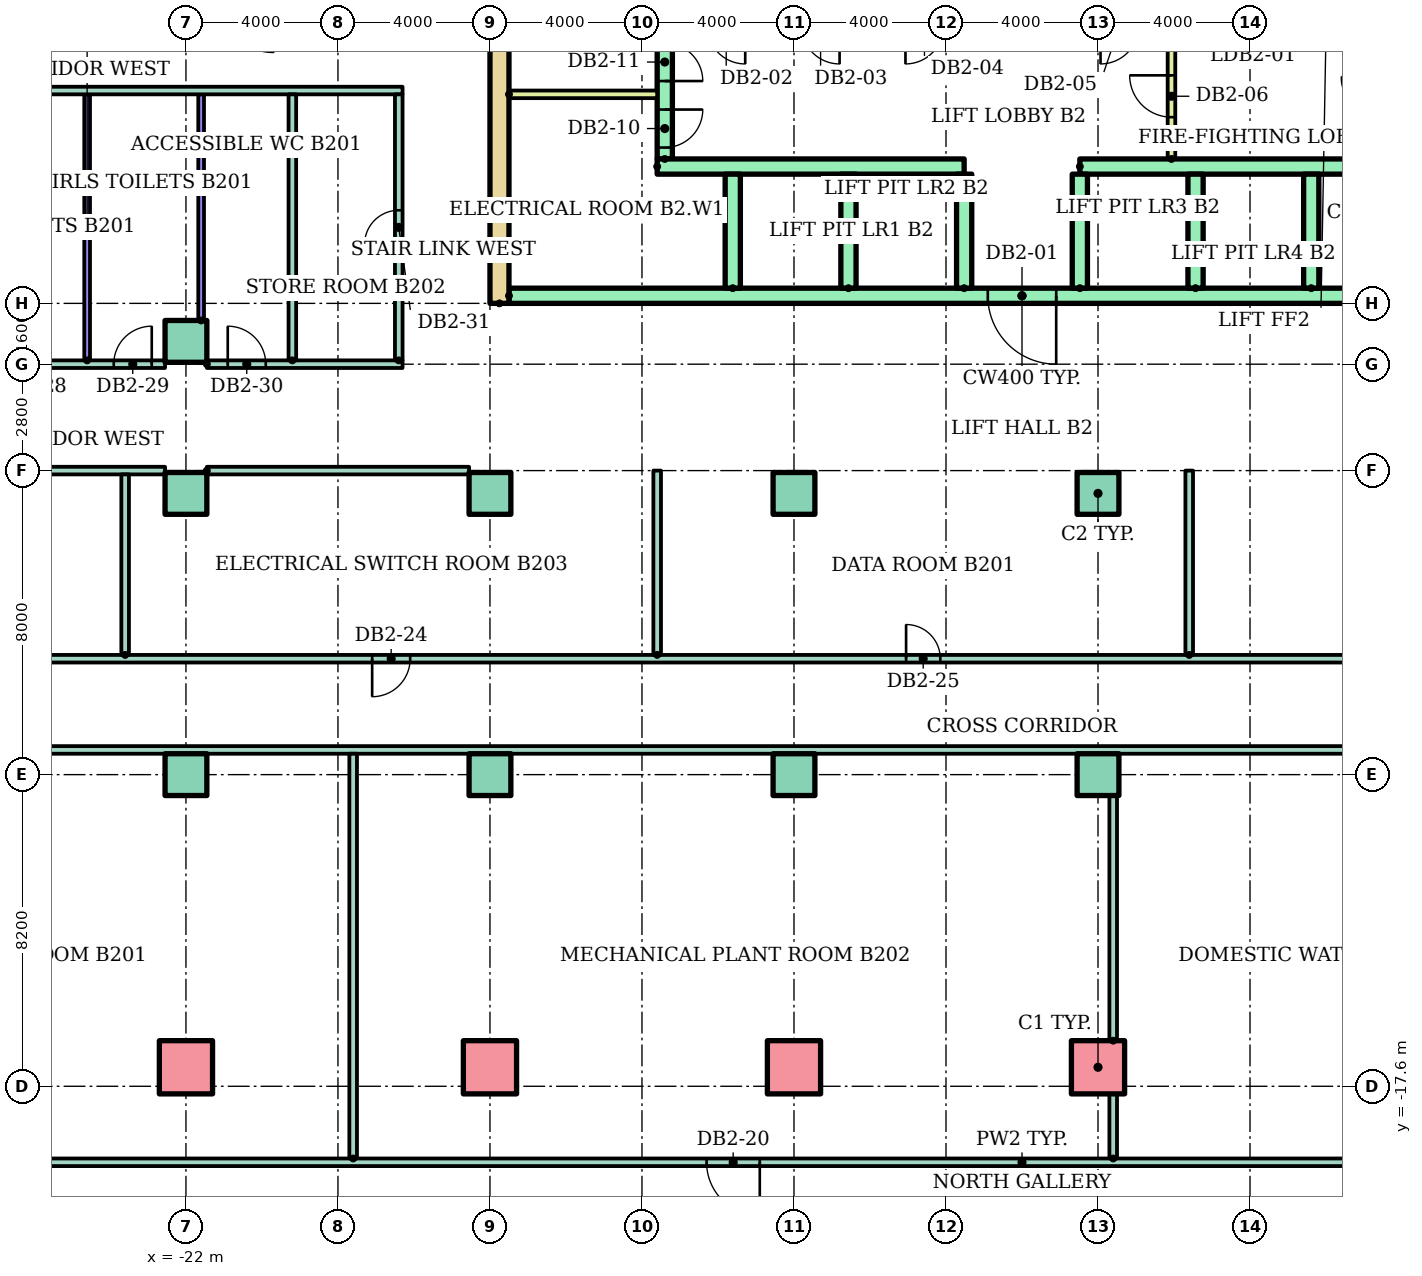
"""IFC4 building model, lengths in metres.
Left out: names, types, materials, properties, quantities, classifications, styles, units other than length and angle.
Written with IfcOpenShell. Run it as: python <this file> out.ifc"""

import sys

from ifc_helpers import new_model, si_unit, direction, frame, frame_2d, origin, origin_2d, place, context, subcontext, project, spatial, rectangle, hollow_rectangle, extrude, element, fill, save


model = new_model("IFC4")
c1 = context("Model", 3, precision=1e-05, world=origin(), true_north=direction((0.0, 1.0)))
c2 = subcontext(c1, "Body", "Model", "MODEL_VIEW")
j1 = project(units=[si_unit("LENGTHUNIT", "METRE"), si_unit("PLANEANGLEUNIT", "RADIAN")], contexts=[c1])
p1 = place(None, origin())
s1 = spatial("IfcSite", under=j1, at=p1, CompositionType="ELEMENT")
p2 = place(p1, origin())
s2 = spatial("IfcBuilding", under=s1, at=p2, CompositionType="ELEMENT")
p3 = place(p2, frame((0.0, 0.0, -10.0)))
s3 = spatial("IfcBuildingStorey", under=s2, at=p3, CompositionType="ELEMENT", Elevation=-10.0)
for number, where in (
    (1, (-22.0, -17.1, -0.3)),
    (2, (-14.0, -17.1, -0.3)),
    (3, (-6.0, -17.1, -0.3)),
    (4, (2.0, -17.1, -0.3)),
):
    element("IfcColumn", number, at=place(p3, frame(where)), inside=s3, PredefinedType="COLUMN", context=c2, shape_type="SweptSolid", body=[
        extrude(hollow_rectangle(XDim=1.4, YDim=1.4, WallThickness=0.08, at=origin_2d()), origin(), (0.0, 0.0, 1.0), 5.3),
    ])
for number, where in (
    (5, (-22.0, -9.4, -0.3)),
    (6, (-14.0, -9.4, -0.3)),
    (7, (-6.0, -9.4, -0.3)),
    (8, (2.0, -9.4, -0.3)),
    (9, (-22.0, -2.0, -0.3)),
    (10, (-14.0, -2.0, -0.3)),
    (11, (-6.0, -2.0, -0.3)),
    (12, (2.0, -2.0, -0.3)),
    (13, (-22.0, 2.0, -0.3)),
):
    element("IfcColumn", number, at=place(p3, frame(where)), inside=s3, PredefinedType="COLUMN", context=c2, shape_type="SweptSolid", body=[
        extrude(rectangle(XDim=1.1, YDim=1.1, at=origin_2d()), origin(), (0.0, 0.0, 1.0), 5.3),
    ])
p4 = place(p3, frame((-13.75, 3.0, 0.0), z_axis=(0.0, 0.0, 1.0), x_axis=(0.0, 1.0, 0.0)))
e14 = element("IfcWall", 14, at=p4, inside=s3, PredefinedType="SHEAR", context=c2, shape_type="SweptSolid", body=[
    extrude(rectangle(XDim=17.4, YDim=0.5, at=frame_2d((8.7, 0.0))), origin(), (0.0, 0.0, 1.0), 4.65),
])
p5 = place(p3, frame((-9.4, 6.8, 0.0), z_axis=(0.0, 0.0, 1.0), x_axis=(0.0, 1.0, 0.0)))
e15 = element("IfcWall", 15, at=p5, inside=s3, PredefinedType="SHEAR", context=c2, shape_type="SweptSolid", body=[
    extrude(rectangle(XDim=12.7, YDim=0.4, at=frame_2d((6.35, 0.0))), origin(), (0.0, 0.0, 1.0), 4.65),
])
p6 = place(p5, frame((0.3, 0.0, 0.0)))
e16 = element("IfcOpeningElement", 16, at=p6, cuts=e15, PredefinedType="OPENING", context=c2, shape_type="SweptSolid", body=[
    extrude(rectangle(XDim=1.0, YDim=2.1, at=frame_2d((0.5, 1.05))), frame((0.0, 0.21, 0.0), z_axis=(0.0, -1.0, 0.0), x_axis=(1.0, 0.0, 0.0)), (0.0, 0.0, 1.0), 0.42),
])
p7 = place(p5, frame((2.05, 0.0, 0.0)))
e17 = element("IfcOpeningElement", 17, at=p7, cuts=e15, PredefinedType="OPENING", context=c2, shape_type="SweptSolid", body=[
    extrude(rectangle(XDim=1.0, YDim=2.1, at=frame_2d((0.5, 1.05))), frame((0.0, 0.21, 0.0), z_axis=(0.0, -1.0, 0.0), x_axis=(1.0, 0.0, 0.0)), (0.0, 0.0, 1.0), 0.42),
])
p8 = place(p5, frame((7.925, 0.0, 0.0)))
e18 = element("IfcOpeningElement", 18, at=p8, cuts=e15, PredefinedType="OPENING", context=c2, shape_type="SweptSolid", body=[
    extrude(rectangle(XDim=1.0, YDim=2.1, at=frame_2d((0.5, 1.05))), frame((0.0, 0.21, 0.0), z_axis=(0.0, -1.0, 0.0), x_axis=(1.0, 0.0, 0.0)), (0.0, 0.0, 1.0), 0.42),
])
p9 = place(p3, frame((-13.5, 3.2, 0.0)))
e19 = element("IfcWall", 19, at=p9, inside=s3, PredefinedType="SHEAR", context=c2, shape_type="SweptSolid", body=[
    extrude(rectangle(XDim=27.0, YDim=0.4, at=frame_2d((13.5, 0.0))), origin(), (0.0, 0.0, 1.0), 4.65),
])
p10 = place(p9, frame((12.6, 0.0, 0.0)))
e20 = element("IfcOpeningElement", 20, at=p10, cuts=e19, PredefinedType="OPENING", context=c2, shape_type="SweptSolid", body=[
    extrude(rectangle(XDim=1.8, YDim=2.1, at=frame_2d((0.9, 1.05))), frame((0.0, 0.21, 0.0), z_axis=(0.0, -1.0, 0.0), x_axis=(1.0, 0.0, 0.0)), (0.0, 0.0, 1.0), 0.42),
])
for number, where in (
    (21, (-9.6, 6.6, 0.0)),
    (22, (1.522, 6.6, 0.0)),
):
    element("IfcWall", number, at=place(p3, frame(where)), inside=s3, PredefinedType="SHEAR", context=c2, shape_type="SweptSolid", body=[
        extrude(rectangle(XDim=8.078, YDim=0.4, at=frame_2d((4.039, 0.0))), origin(), (0.0, 0.0, 1.0), 4.65),
    ])
for number, where, z_axis, x_axis in (
    (23, (-7.611, 3.4, 0.0), (0.0, 0.0, 1.0), (0.0, 1.0, 0.0)),
    (24, (-4.567, 3.4, 0.0), (0.0, 0.0, 1.0), (0.0, 1.0, 0.0)),
    (25, (-1.522, 3.4, 0.0), (0.0, 0.0, 1.0), (0.0, 1.0, 0.0)),
    (26, (1.522, 3.4, 0.0), (0.0, 0.0, 1.0), (0.0, 1.0, 0.0)),
    (27, (4.567, 3.4, 0.0), (0.0, 0.0, 1.0), (0.0, 1.0, 0.0)),
    (28, (7.611, 3.4, 0.0), (0.0, 0.0, 1.0), (0.0, 1.0, 0.0)),
):
    element("IfcWall", number, at=place(p3, frame(where, z_axis=z_axis, x_axis=x_axis)), inside=s3, PredefinedType="SHEAR", context=c2, shape_type="SweptSolid", body=[
        extrude(rectangle(XDim=3.0, YDim=0.4, at=frame_2d((1.5, 0.0))), origin(), (0.0, 0.0, 1.0), 4.65),
    ])
p11 = place(p3, frame((3.933, 6.8, 0.0), z_axis=(0.0, 0.0, 1.0), x_axis=(0.0, 1.0, 0.0)))
e29 = element("IfcWall", 29, at=p11, inside=s3, PredefinedType="PARTITIONING", context=c2, shape_type="SweptSolid", body=[
    extrude(rectangle(XDim=3.3, YDim=0.2, at=frame_2d((1.65, 0.0))), origin(), (0.0, 0.0, 1.0), 4.65),
])
p12 = place(p11, frame((1.1, 0.0, 0.0)))
e30 = element("IfcOpeningElement", 30, at=p12, cuts=e29, PredefinedType="OPENING", context=c2, shape_type="SweptSolid", body=[
    extrude(rectangle(XDim=1.1, YDim=2.1, at=frame_2d((0.55, 1.05))), frame((0.0, 0.11, 0.0), z_axis=(0.0, -1.0, 0.0), x_axis=(1.0, 0.0, 0.0)), (0.0, 0.0, 1.0), 0.22),
])
p13 = place(p3, frame((-13.5, 8.5, 0.0)))
e31 = element("IfcWall", 31, at=p13, inside=s3, PredefinedType="PARTITIONING", context=c2, shape_type="SweptSolid", body=[
    extrude(rectangle(XDim=3.9, YDim=0.2, at=frame_2d((1.95, 0.0))), origin(), (0.0, 0.0, 1.0), 4.65),
])
p14 = place(p3, frame((-37.6, -19.6, 0.0)))
e32 = element("IfcWall", 32, at=p14, inside=s3, PredefinedType="PARTITIONING", context=c2, shape_type="SweptSolid", body=[
    extrude(rectangle(XDim=75.2, YDim=0.2, at=frame_2d((37.6, 0.0))), origin(), (0.0, 0.0, 1.0), 4.65),
])
p15 = place(p14, frame((9.3, 0.0, 0.0)))
e33 = element("IfcOpeningElement", 33, at=p15, cuts=e32, PredefinedType="OPENING", context=c2, shape_type="SweptSolid", body=[
    extrude(rectangle(XDim=1.4, YDim=2.1, at=frame_2d((0.7, 1.05))), frame((0.0, 0.11, 0.0), z_axis=(0.0, -1.0, 0.0), x_axis=(1.0, 0.0, 0.0)), (0.0, 0.0, 1.0), 0.22),
])
p16 = place(p14, frame((29.3, 0.0, 0.0)))
e34 = element("IfcOpeningElement", 34, at=p16, cuts=e32, PredefinedType="OPENING", context=c2, shape_type="SweptSolid", body=[
    extrude(rectangle(XDim=1.4, YDim=2.1, at=frame_2d((0.7, 1.05))), frame((0.0, 0.11, 0.0), z_axis=(0.0, -1.0, 0.0), x_axis=(1.0, 0.0, 0.0)), (0.0, 0.0, 1.0), 0.22),
])
p17 = place(p14, frame((46.5, 0.0, 0.0)))
e35 = element("IfcOpeningElement", 35, at=p17, cuts=e32, PredefinedType="OPENING", context=c2, shape_type="SweptSolid", body=[
    extrude(rectangle(XDim=1.0, YDim=2.1, at=frame_2d((0.5, 1.05))), frame((0.0, 0.11, 0.0), z_axis=(0.0, -1.0, 0.0), x_axis=(1.0, 0.0, 0.0)), (0.0, 0.0, 1.0), 0.22),
])
p18 = place(p14, frame((64.15, 0.0, 0.0)))
e36 = element("IfcOpeningElement", 36, at=p18, cuts=e32, PredefinedType="OPENING", context=c2, shape_type="SweptSolid", body=[
    extrude(rectangle(XDim=0.9, YDim=2.1, at=frame_2d((0.45, 1.05))), frame((0.0, 0.11, 0.0), z_axis=(0.0, -1.0, 0.0), x_axis=(1.0, 0.0, 0.0)), (0.0, 0.0, 1.0), 0.22),
])
p19 = place(p3, frame((-36.8, -8.75, 0.0)))
e37 = element("IfcWall", 37, at=p19, inside=s3, PredefinedType="PARTITIONING", context=c2, shape_type="SweptSolid", body=[
    extrude(rectangle(XDim=73.6, YDim=0.2, at=frame_2d((36.8, 0.0))), origin(), (0.0, 0.0, 1.0), 4.65),
])
p20 = place(p3, frame((-37.6, -6.35, 0.0)))
e38 = element("IfcWall", 38, at=p20, inside=s3, PredefinedType="PARTITIONING", context=c2, shape_type="SweptSolid", body=[
    extrude(rectangle(XDim=75.2, YDim=0.2, at=frame_2d((37.6, 0.0))), origin(), (0.0, 0.0, 1.0), 4.65),
])
p21 = place(p20, frame((6.5, 0.0, 0.0)))
e39 = element("IfcOpeningElement", 39, at=p21, cuts=e38, PredefinedType="OPENING", context=c2, shape_type="SweptSolid", body=[
    extrude(rectangle(XDim=1.0, YDim=2.1, at=frame_2d((0.5, 1.05))), frame((0.0, 0.11, 0.0), z_axis=(0.0, -1.0, 0.0), x_axis=(1.0, 0.0, 0.0)), (0.0, 0.0, 1.0), 0.22),
])
p22 = place(p20, frame((20.5, 0.0, 0.0)))
e40 = element("IfcOpeningElement", 40, at=p22, cuts=e38, PredefinedType="OPENING", context=c2, shape_type="SweptSolid", body=[
    extrude(rectangle(XDim=1.0, YDim=2.1, at=frame_2d((0.5, 1.05))), frame((0.0, 0.11, 0.0), z_axis=(0.0, -1.0, 0.0), x_axis=(1.0, 0.0, 0.0)), (0.0, 0.0, 1.0), 0.22),
])
p23 = place(p20, frame((34.55, 0.0, 0.0)))
e41 = element("IfcOpeningElement", 41, at=p23, cuts=e38, PredefinedType="OPENING", context=c2, shape_type="SweptSolid", body=[
    extrude(rectangle(XDim=0.9, YDim=2.1, at=frame_2d((0.45, 1.05))), frame((0.0, 0.11, 0.0), z_axis=(0.0, -1.0, 0.0), x_axis=(1.0, 0.0, 0.0)), (0.0, 0.0, 1.0), 0.22),
])
p24 = place(p20, frame((58.1, 0.0, 0.0)))
e42 = element("IfcOpeningElement", 42, at=p24, cuts=e38, PredefinedType="OPENING", context=c2, shape_type="SweptSolid", body=[
    extrude(rectangle(XDim=1.0, YDim=2.1, at=frame_2d((0.5, 1.05))), frame((0.0, 0.11, 0.0), z_axis=(0.0, -1.0, 0.0), x_axis=(1.0, 0.0, 0.0)), (0.0, 0.0, 1.0), 0.22),
])
for number, where in (
    (43, (-29.45, -1.4, 0.0)),
    (44, (-21.45, -1.4, 0.0)),
):
    element("IfcWall", number, at=place(p3, frame(where)), inside=s3, PredefinedType="PARTITIONING", context=c2, shape_type="SweptSolid", body=[
        extrude(rectangle(XDim=6.9, YDim=0.2, at=frame_2d((3.45, 0.0))), origin(), (0.0, 0.0, 1.0), 4.65),
    ])
p25 = place(p3, frame((-29.45, 1.4, 0.0)))
e45 = element("IfcWall", 45, at=p25, inside=s3, PredefinedType="PARTITIONING", context=c2, shape_type="SweptSolid", body=[
    extrude(rectangle(XDim=6.9, YDim=0.2, at=frame_2d((3.45, 0.0))), origin(), (0.0, 0.0, 1.0), 4.65),
])
p26 = place(p25, frame((2.85, 0.0, 0.0)))
e46 = element("IfcOpeningElement", 46, at=p26, cuts=e45, PredefinedType="OPENING", context=c2, shape_type="SweptSolid", body=[
    extrude(rectangle(XDim=1.0, YDim=2.1, at=frame_2d((0.5, 1.05))), frame((0.0, 0.11, 0.0), z_axis=(0.0, -1.0, 0.0), x_axis=(1.0, 0.0, 0.0)), (0.0, 0.0, 1.0), 0.22),
])
p27 = place(p25, frame((5.55, 0.0, 0.0)))
e47 = element("IfcOpeningElement", 47, at=p27, cuts=e45, PredefinedType="OPENING", context=c2, shape_type="SweptSolid", body=[
    extrude(rectangle(XDim=1.0, YDim=2.1, at=frame_2d((0.5, 1.05))), frame((0.0, 0.11, 0.0), z_axis=(0.0, -1.0, 0.0), x_axis=(1.0, 0.0, 0.0)), (0.0, 0.0, 1.0), 0.22),
])
p28 = place(p3, frame((-21.45, 1.4, 0.0)))
e48 = element("IfcWall", 48, at=p28, inside=s3, PredefinedType="PARTITIONING", context=c2, shape_type="SweptSolid", body=[
    extrude(rectangle(XDim=5.15, YDim=0.2, at=frame_2d((2.575, 0.0))), origin(), (0.0, 0.0, 1.0), 4.65),
])
p29 = place(p28, frame((0.55, 0.0, 0.0)))
e49 = element("IfcOpeningElement", 49, at=p29, cuts=e48, PredefinedType="OPENING", context=c2, shape_type="SweptSolid", body=[
    extrude(rectangle(XDim=1.0, YDim=2.1, at=frame_2d((0.5, 1.05))), frame((0.0, 0.11, 0.0), z_axis=(0.0, -1.0, 0.0), x_axis=(1.0, 0.0, 0.0)), (0.0, 0.0, 1.0), 0.22),
])
p30 = place(p3, frame((-37.6, 8.6, 0.0)))
e50 = element("IfcWall", 50, at=p30, inside=s3, PredefinedType="PARTITIONING", context=c2, shape_type="SweptSolid", body=[
    extrude(rectangle(XDim=21.3, YDim=0.2, at=frame_2d((10.65, 0.0))), origin(), (0.0, 0.0, 1.0), 4.65),
])
p31 = place(p3, frame((-24.6, 1.5, 0.0), z_axis=(0.0, 0.0, 1.0), x_axis=(0.0, 1.0, 0.0)))
e51 = element("IfcWall", 51, at=p31, inside=s3, PredefinedType="PARTITIONING", context=c2, shape_type="SweptSolid", body=[
    extrude(rectangle(XDim=7.0, YDim=0.15, at=frame_2d((3.5, 0.0))), origin(), (0.0, 0.0, 1.0), 4.65),
])
p32 = place(p3, frame((-23.6, -6.25, 0.0), z_axis=(0.0, 0.0, 1.0), x_axis=(0.0, 1.0, 0.0)))
e52 = element("IfcWall", 52, at=p32, inside=s3, PredefinedType="PARTITIONING", context=c2, shape_type="SweptSolid", body=[
    extrude(rectangle(XDim=4.75, YDim=0.2, at=frame_2d((2.375, 0.0))), origin(), (0.0, 0.0, 1.0), 4.65),
])
p33 = place(p3, frame((-21.6, 2.55, 0.0), z_axis=(0.0, 0.0, 1.0), x_axis=(0.0, 1.0, 0.0)))
e53 = element("IfcWall", 53, at=p33, inside=s3, PredefinedType="PARTITIONING", context=c2, shape_type="SweptSolid", body=[
    extrude(rectangle(XDim=5.95, YDim=0.15, at=frame_2d((2.975, 0.0))), origin(), (0.0, 0.0, 1.0), 4.65),
])
p34 = place(p3, frame((-19.2, 1.5, 0.0), z_axis=(0.0, 0.0, 1.0), x_axis=(0.0, 1.0, 0.0)))
e54 = element("IfcWall", 54, at=p34, inside=s3, PredefinedType="PARTITIONING", context=c2, shape_type="SweptSolid", body=[
    extrude(rectangle(XDim=7.0, YDim=0.2, at=frame_2d((3.5, 0.0))), origin(), (0.0, 0.0, 1.0), 4.65),
])
p35 = place(p3, frame((-17.6, -19.5, 0.0), z_axis=(0.0, 0.0, 1.0), x_axis=(0.0, 1.0, 0.0)))
e55 = element("IfcWall", 55, at=p35, inside=s3, PredefinedType="PARTITIONING", context=c2, shape_type="SweptSolid", body=[
    extrude(rectangle(XDim=10.65, YDim=0.2, at=frame_2d((5.325, 0.0))), origin(), (0.0, 0.0, 1.0), 4.65),
])
p36 = place(p3, frame((-16.4, 1.5, 0.0), z_axis=(0.0, 0.0, 1.0), x_axis=(0.0, 1.0, 0.0)))
e56 = element("IfcWall", 56, at=p36, inside=s3, PredefinedType="PARTITIONING", context=c2, shape_type="SweptSolid", body=[
    extrude(rectangle(XDim=7.0, YDim=0.2, at=frame_2d((3.5, 0.0))), origin(), (0.0, 0.0, 1.0), 4.65),
])
p37 = place(p36, frame((3.05, 0.0, 0.0)))
e57 = element("IfcOpeningElement", 57, at=p37, cuts=e56, PredefinedType="OPENING", context=c2, shape_type="SweptSolid", body=[
    extrude(rectangle(XDim=0.9, YDim=2.1, at=frame_2d((0.45, 1.05))), frame((0.0, 0.11, 0.0), z_axis=(0.0, -1.0, 0.0), x_axis=(1.0, 0.0, 0.0)), (0.0, 0.0, 1.0), 0.22),
])
p38 = place(p3, frame((-9.6, -6.25, 0.0), z_axis=(0.0, 0.0, 1.0), x_axis=(0.0, 1.0, 0.0)))
e58 = element("IfcWall", 58, at=p38, inside=s3, PredefinedType="PARTITIONING", context=c2, shape_type="SweptSolid", body=[
    extrude(rectangle(XDim=4.85, YDim=0.2, at=frame_2d((2.425, 0.0))), origin(), (0.0, 0.0, 1.0), 4.65),
])
p39 = place(p3, frame((2.4, -19.5, 0.0), z_axis=(0.0, 0.0, 1.0), x_axis=(0.0, 1.0, 0.0)))
e59 = element("IfcWall", 59, at=p39, inside=s3, PredefinedType="PARTITIONING", context=c2, shape_type="SweptSolid", body=[
    extrude(rectangle(XDim=1.7, YDim=0.2, at=frame_2d((0.85, 0.0))), origin(), (0.0, 0.0, 1.0), 4.65),
])
p40 = place(p3, frame((2.4, -16.4, 0.0), z_axis=(0.0, 0.0, 1.0), x_axis=(0.0, 1.0, 0.0)))
e60 = element("IfcWall", 60, at=p40, inside=s3, PredefinedType="PARTITIONING", context=c2, shape_type="SweptSolid", body=[
    extrude(rectangle(XDim=6.45, YDim=0.2, at=frame_2d((3.225, 0.0))), origin(), (0.0, 0.0, 1.0), 4.65),
])
p41 = place(p3, frame((4.4, -6.25, 0.0), z_axis=(0.0, 0.0, 1.0), x_axis=(0.0, 1.0, 0.0)))
e61 = element("IfcWall", 61, at=p41, inside=s3, PredefinedType="PARTITIONING", context=c2, shape_type="SweptSolid", body=[
    extrude(rectangle(XDim=4.85, YDim=0.2, at=frame_2d((2.425, 0.0))), origin(), (0.0, 0.0, 1.0), 4.65),
])
p42 = place(p10, frame((1.8, 0.0, 0.0), z_axis=(0.0, 0.0, 1.0), x_axis=(-1.0, 0.0, 0.0)))
e62 = element("IfcDoor", 62, at=p42, inside=s3, OperationType="DOUBLE_DOOR_SINGLE_SWING", PredefinedType="DOOR", context=c2, shape_type="SweptSolid", body=[
    extrude(rectangle(XDim=1.8, YDim=2.1, at=frame_2d((0.9, 1.05))), frame((0.0, 0.025, 0.0), z_axis=(0.0, -1.0, 0.0), x_axis=(1.0, 0.0, 0.0)), (0.0, 0.0, 1.0), 0.05),
])
fill(e20, e62)
p43 = place(p12, origin())
e63 = element("IfcDoor", 63, at=p43, inside=s3, OperationType="SINGLE_SWING_RIGHT", PredefinedType="DOOR", context=c2, shape_type="SweptSolid", body=[
    extrude(rectangle(XDim=1.1, YDim=2.1, at=frame_2d((0.55, 1.05))), frame((0.0, 0.025, 0.0), z_axis=(0.0, -1.0, 0.0), x_axis=(1.0, 0.0, 0.0)), (0.0, 0.0, 1.0), 0.05),
])
fill(e30, e63)
p44 = place(p6, frame((1.0, 0.0, 0.0), z_axis=(0.0, 0.0, 1.0), x_axis=(-1.0, 0.0, 0.0)))
e64 = element("IfcDoor", 64, at=p44, inside=s3, OperationType="SINGLE_SWING_RIGHT", PredefinedType="DOOR", context=c2, shape_type="SweptSolid", body=[
    extrude(rectangle(XDim=1.0, YDim=2.1, at=frame_2d((0.5, 1.05))), frame((0.0, 0.025, 0.0), z_axis=(0.0, -1.0, 0.0), x_axis=(1.0, 0.0, 0.0)), (0.0, 0.0, 1.0), 0.05),
])
fill(e16, e64)
p45 = place(p7, frame((1.0, 0.0, 0.0), z_axis=(0.0, 0.0, 1.0), x_axis=(-1.0, 0.0, 0.0)))
e65 = element("IfcDoor", 65, at=p45, inside=s3, OperationType="SINGLE_SWING_LEFT", PredefinedType="DOOR", context=c2, shape_type="SweptSolid", body=[
    extrude(rectangle(XDim=1.0, YDim=2.1, at=frame_2d((0.5, 1.05))), frame((0.0, 0.025, 0.0), z_axis=(0.0, -1.0, 0.0), x_axis=(1.0, 0.0, 0.0)), (0.0, 0.0, 1.0), 0.05),
])
fill(e17, e65)
p46 = place(p16, frame((1.4, 0.0, 0.0), z_axis=(0.0, 0.0, 1.0), x_axis=(-1.0, 0.0, 0.0)))
e66 = element("IfcDoor", 66, at=p46, inside=s3, OperationType="DOUBLE_DOOR_SINGLE_SWING", PredefinedType="DOOR", context=c2, shape_type="SweptSolid", body=[
    extrude(rectangle(XDim=1.4, YDim=2.1, at=frame_2d((0.7, 1.05))), frame((0.0, 0.025, 0.0), z_axis=(0.0, -1.0, 0.0), x_axis=(1.0, 0.0, 0.0)), (0.0, 0.0, 1.0), 0.05),
])
fill(e34, e66)
p47 = place(p22, frame((1.0, 0.0, 0.0), z_axis=(0.0, 0.0, 1.0), x_axis=(-1.0, 0.0, 0.0)))
e67 = element("IfcDoor", 67, at=p47, inside=s3, OperationType="SINGLE_SWING_LEFT", PredefinedType="DOOR", context=c2, shape_type="SweptSolid", body=[
    extrude(rectangle(XDim=1.0, YDim=2.1, at=frame_2d((0.5, 1.05))), frame((0.0, 0.025, 0.0), z_axis=(0.0, -1.0, 0.0), x_axis=(1.0, 0.0, 0.0)), (0.0, 0.0, 1.0), 0.05),
])
fill(e40, e67)
p48 = place(p23, origin())
e68 = element("IfcDoor", 68, at=p48, inside=s3, OperationType="SINGLE_SWING_LEFT", PredefinedType="DOOR", context=c2, shape_type="SweptSolid", body=[
    extrude(rectangle(XDim=0.9, YDim=2.1, at=frame_2d((0.45, 1.05))), frame((0.0, 0.025, 0.0), z_axis=(0.0, -1.0, 0.0), x_axis=(1.0, 0.0, 0.0)), (0.0, 0.0, 1.0), 0.05),
])
fill(e41, e68)
p49 = place(p27, origin())
e69 = element("IfcDoor", 69, at=p49, inside=s3, OperationType="SINGLE_SWING_RIGHT", PredefinedType="DOOR", context=c2, shape_type="SweptSolid", body=[
    extrude(rectangle(XDim=1.0, YDim=2.1, at=frame_2d((0.5, 1.05))), frame((0.0, 0.025, 0.0), z_axis=(0.0, -1.0, 0.0), x_axis=(1.0, 0.0, 0.0)), (0.0, 0.0, 1.0), 0.05),
])
fill(e47, e69)
p50 = place(p29, origin())
e70 = element("IfcDoor", 70, at=p50, inside=s3, OperationType="SINGLE_SWING_LEFT", PredefinedType="DOOR", context=c2, shape_type="SweptSolid", body=[
    extrude(rectangle(XDim=1.0, YDim=2.1, at=frame_2d((0.5, 1.05))), frame((0.0, 0.025, 0.0), z_axis=(0.0, -1.0, 0.0), x_axis=(1.0, 0.0, 0.0)), (0.0, 0.0, 1.0), 0.05),
])
fill(e49, e70)
p51 = place(p37, origin())
e71 = element("IfcDoor", 71, at=p51, inside=s3, OperationType="SINGLE_SWING_LEFT", PredefinedType="DOOR", context=c2, shape_type="SweptSolid", body=[
    extrude(rectangle(XDim=0.9, YDim=2.1, at=frame_2d((0.45, 1.05))), frame((0.0, 0.025, 0.0), z_axis=(0.0, -1.0, 0.0), x_axis=(1.0, 0.0, 0.0)), (0.0, 0.0, 1.0), 0.05),
])
fill(e57, e71)
save(model, sys.argv[1])
